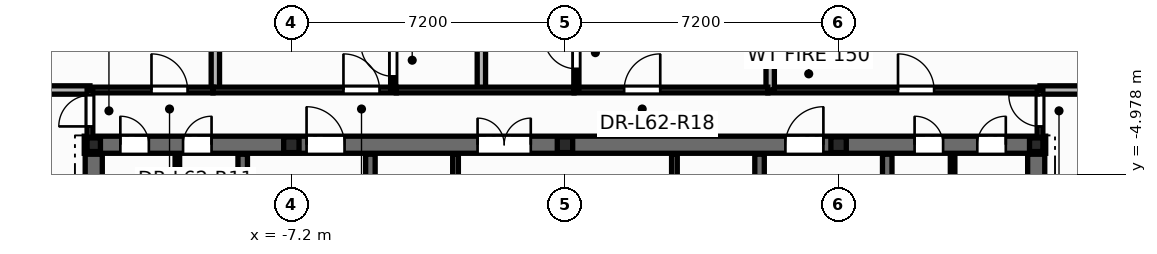
"""IFC4 building model, lengths in metres.
Left out: names, types, materials, properties, quantities, classifications, styles, units other than length and angle.
Written with IfcOpenShell. Run it as: python <this file> out.ifc"""

import sys

from ifc_helpers import new_model, si_unit, direction, frame, frame_2d, origin, origin_2d, place, context, subcontext, project, spatial, rectangle, i_section, extrude, element, fill, save


model = new_model("IFC4")
c1 = context("Model", 3, precision=1e-05, world=origin(), true_north=direction((0.0, 1.0)))
c2 = subcontext(c1, "Body", "Model", "MODEL_VIEW")
j1 = project(units=[si_unit("LENGTHUNIT", "METRE"), si_unit("PLANEANGLEUNIT", "RADIAN")], contexts=[c1])
p1 = place(None, origin())
s1 = spatial("IfcSite", under=j1, at=p1, CompositionType="ELEMENT")
p2 = place(p1, origin())
s2 = spatial("IfcBuilding", under=s1, at=p2, CompositionType="ELEMENT")
p3 = place(p2, frame((0.0, 0.0, 237.0)))
s3 = spatial("IfcBuildingStorey", under=s2, at=p3, CompositionType="ELEMENT", Elevation=237.0)
for number, where, z_axis, x_axis in (
    (1, (12.4, -4.2, 0.0), (0.0, 0.0, 1.0), (1.0, 0.0, 0.0)),
    (2, (-12.4, -4.2, 0.0), (0.0, 0.0, 1.0), (1.0, 0.0, 0.0)),
):
    element("IfcColumn", number, at=place(p3, frame(where, z_axis=z_axis, x_axis=x_axis)), inside=s3, PredefinedType="COLUMN", context=c2, shape_type="SweptSolid", body=[
        extrude(i_section(OverallWidth=0.352, OverallDepth=0.359, WebThickness=0.018, FlangeThickness=0.026, at=origin_2d()), origin(), (0.0, 0.0, 1.0), 3.6),
    ])
for number, where, z_axis, x_axis in (
    (3, (-7.2, -4.2, 0.0), (0.0, 0.0, 1.0), (1.0, 0.0, 0.0)),
    (4, (0.0, -4.2, 0.0), (0.0, 0.0, 1.0), (1.0, 0.0, 0.0)),
    (5, (7.2, -4.2, 0.0), (0.0, 0.0, 1.0), (1.0, 0.0, 0.0)),
):
    element("IfcColumn", number, at=place(p3, frame(where, z_axis=z_axis, x_axis=x_axis)), inside=s3, PredefinedType="PILASTER", context=c2, shape_type="SweptSolid", body=[
        extrude(i_section(OverallWidth=0.405, OverallDepth=0.414, WebThickness=0.022, FlangeThickness=0.032, at=origin_2d()), origin(), (0.0, 0.0, 1.0), 3.6),
    ])
p4 = place(p3, frame((-2.88, -7.1, 0.0), z_axis=(0.0, 0.0, 1.0), x_axis=(0.0, 1.0, 0.0)))
e6 = element("IfcWall", 6, at=p4, inside=s3, PredefinedType="PARTITIONING", context=c2, shape_type="SweptSolid", body=[
    extrude(rectangle(XDim=2.65, YDim=0.15, at=frame_2d((1.325, 0.0))), origin(), (0.0, 0.0, 1.0), 3.345),
])
p5 = place(p4, frame((0.85, 0.0, 0.0)))
e7 = element("IfcOpeningElement", 7, at=p5, cuts=e6, PredefinedType="OPENING", context=c2, shape_type="SweptSolid", body=[
    extrude(rectangle(XDim=0.886, YDim=2.104, at=frame_2d((0.44, 1.052))), frame((0.0, 0.085, 0.0), z_axis=(0.0, -1.0, 0.0), x_axis=(1.0, 0.0, 0.0)), (0.0, 0.0, 1.0), 0.17),
])
p6 = place(p3, frame((2.88, -7.1, 0.0), z_axis=(0.0, 0.0, 1.0), x_axis=(0.0, 1.0, 0.0)))
e8 = element("IfcWall", 8, at=p6, inside=s3, PredefinedType="PARTITIONING", context=c2, shape_type="SweptSolid", body=[
    extrude(rectangle(XDim=2.65, YDim=0.15, at=frame_2d((1.325, 0.0))), origin(), (0.0, 0.0, 1.0), 3.345),
])
p7 = place(p6, frame((0.85, 0.0, 0.0)))
e9 = element("IfcOpeningElement", 9, at=p7, cuts=e8, PredefinedType="OPENING", context=c2, shape_type="SweptSolid", body=[
    extrude(rectangle(XDim=0.886, YDim=2.104, at=frame_2d((0.44, 1.052))), frame((0.0, 0.085, 0.0), z_axis=(0.0, -1.0, 0.0), x_axis=(1.0, 0.0, 0.0)), (0.0, 0.0, 1.0), 0.17),
])
for number, where, z_axis, x_axis in (
    (10, (-10.2, -5.52, 0.0), (0.0, 0.0, 1.0), (0.0, 1.0, 0.0)),
    (11, (10.2, -5.52, 0.0), (0.0, 0.0, 1.0), (0.0, 1.0, 0.0)),
):
    element("IfcWall", number, at=place(p3, frame(where, z_axis=z_axis, x_axis=x_axis)), inside=s3, PredefinedType="PARTITIONING", context=c2, shape_type="SweptSolid", body=[
        extrude(rectangle(XDim=1.12, YDim=0.12, at=frame_2d((0.56, 0.0))), origin(), (0.0, 0.0, 1.0), 3.345),
    ])
p8 = place(p3, frame((-12.65, -4.2, 0.0), z_axis=(0.0, 0.0, 1.0), x_axis=(1.0, 0.0, 0.0)))
e12 = element("IfcWall", 12, at=p8, inside=s3, PredefinedType="SHEAR", context=c2, shape_type="SweptSolid", body=[
    extrude(rectangle(XDim=25.3, YDim=0.45, at=frame_2d((12.65, 0.0))), origin(), (0.0, 0.0, 1.0), 3.6),
])
p9 = place(p8, frame((0.95, 0.0, 0.0)))
e13 = element("IfcOpeningElement", 13, at=p9, cuts=e12, PredefinedType="OPENING", context=c2, shape_type="SweptSolid", body=[
    extrude(rectangle(XDim=0.756, YDim=2.054, at=frame_2d((0.375, 1.027))), frame((0.0, 0.235, 0.0), z_axis=(0.0, -1.0, 0.0), x_axis=(1.0, 0.0, 0.0)), (0.0, 0.0, 1.0), 0.47),
])
p10 = place(p8, frame((2.6, 0.0, 0.0)))
e14 = element("IfcOpeningElement", 14, at=p10, cuts=e12, PredefinedType="OPENING", context=c2, shape_type="SweptSolid", body=[
    extrude(rectangle(XDim=0.756, YDim=2.054, at=frame_2d((0.375, 1.027))), frame((0.0, 0.235, 0.0), z_axis=(0.0, -1.0, 0.0), x_axis=(1.0, 0.0, 0.0)), (0.0, 0.0, 1.0), 0.47),
])
p11 = place(p8, frame((21.85, 0.0, 0.0)))
e15 = element("IfcOpeningElement", 15, at=p11, cuts=e12, PredefinedType="OPENING", context=c2, shape_type="SweptSolid", body=[
    extrude(rectangle(XDim=0.756, YDim=2.054, at=frame_2d((0.375, 1.027))), frame((0.0, 0.235, 0.0), z_axis=(0.0, -1.0, 0.0), x_axis=(1.0, 0.0, 0.0)), (0.0, 0.0, 1.0), 0.47),
])
p12 = place(p8, frame((23.5, 0.0, 0.0)))
e16 = element("IfcOpeningElement", 16, at=p12, cuts=e12, PredefinedType="OPENING", context=c2, shape_type="SweptSolid", body=[
    extrude(rectangle(XDim=0.756, YDim=2.054, at=frame_2d((0.375, 1.027))), frame((0.0, 0.235, 0.0), z_axis=(0.0, -1.0, 0.0), x_axis=(1.0, 0.0, 0.0)), (0.0, 0.0, 1.0), 0.47),
])
p13 = place(p8, frame((5.85, 0.0, 0.0)))
e17 = element("IfcOpeningElement", 17, at=p13, cuts=e12, PredefinedType="OPENING", context=c2, shape_type="SweptSolid", body=[
    extrude(rectangle(XDim=1.006, YDim=2.104, at=frame_2d((0.5, 1.052))), frame((0.0, 0.235, 0.0), z_axis=(0.0, -1.0, 0.0), x_axis=(1.0, 0.0, 0.0)), (0.0, 0.0, 1.0), 0.47),
])
p14 = place(p8, frame((10.35, 0.0, 0.0)))
e18 = element("IfcOpeningElement", 18, at=p14, cuts=e12, PredefinedType="OPENING", context=c2, shape_type="SweptSolid", body=[
    extrude(rectangle(XDim=1.406, YDim=2.154, at=frame_2d((0.7, 1.077))), frame((0.0, 0.235, 0.0), z_axis=(0.0, -1.0, 0.0), x_axis=(1.0, 0.0, 0.0)), (0.0, 0.0, 1.0), 0.47),
])
p15 = place(p8, frame((18.45, 0.0, 0.0)))
e19 = element("IfcOpeningElement", 19, at=p15, cuts=e12, PredefinedType="OPENING", context=c2, shape_type="SweptSolid", body=[
    extrude(rectangle(XDim=1.006, YDim=2.104, at=frame_2d((0.5, 1.052))), frame((0.0, 0.235, 0.0), z_axis=(0.0, -1.0, 0.0), x_axis=(1.0, 0.0, 0.0)), (0.0, 0.0, 1.0), 0.47),
])
p16 = place(p3, frame((-8.48, -13.85, 0.0), z_axis=(0.0, 0.0, 1.0), x_axis=(0.0, 1.0, 0.0)))
e20 = element("IfcWall", 20, at=p16, inside=s3, PredefinedType="SHEAR", context=c2, shape_type="SweptSolid", body=[
    extrude(rectangle(XDim=9.4, YDim=0.25, at=frame_2d((4.7, 0.0))), origin(), (0.0, 0.0, 1.0), 3.6),
])
p17 = place(p16, frame((6.95, 0.0, 0.0)))
e21 = element("IfcOpeningElement", 21, at=p17, cuts=e20, PredefinedType="OPENING", context=c2, shape_type="SweptSolid", body=[
    extrude(rectangle(XDim=1.006, YDim=2.104, at=frame_2d((0.5, 1.052))), frame((0.0, 0.135, 0.0), z_axis=(0.0, -1.0, 0.0), x_axis=(1.0, 0.0, 0.0)), (0.0, 0.0, 1.0), 0.27),
])
p18 = place(p3, frame((8.48, -13.85, 0.0), z_axis=(0.0, 0.0, 1.0), x_axis=(0.0, 1.0, 0.0)))
e22 = element("IfcWall", 22, at=p18, inside=s3, PredefinedType="SHEAR", context=c2, shape_type="SweptSolid", body=[
    extrude(rectangle(XDim=9.4, YDim=0.25, at=frame_2d((4.7, 0.0))), origin(), (0.0, 0.0, 1.0), 3.6),
])
p19 = place(p18, frame((6.95, 0.0, 0.0)))
e23 = element("IfcOpeningElement", 23, at=p19, cuts=e22, PredefinedType="OPENING", context=c2, shape_type="SweptSolid", body=[
    extrude(rectangle(XDim=1.006, YDim=2.104, at=frame_2d((0.5, 1.052))), frame((0.0, 0.135, 0.0), z_axis=(0.0, -1.0, 0.0), x_axis=(1.0, 0.0, 0.0)), (0.0, 0.0, 1.0), 0.27),
])
for number, where, z_axis, x_axis in (
    (24, (-5.12, -13.85, 0.0), (0.0, 0.0, 1.0), (0.0, 1.0, 0.0)),
    (25, (5.12, -13.85, 0.0), (0.0, 0.0, 1.0), (0.0, 1.0, 0.0)),
):
    element("IfcWall", number, at=place(p3, frame(where, z_axis=z_axis, x_axis=x_axis)), inside=s3, PredefinedType="SHEAR", context=c2, shape_type="SweptSolid", body=[
        extrude(rectangle(XDim=9.4, YDim=0.25, at=frame_2d((4.7, 0.0))), origin(), (0.0, 0.0, 1.0), 3.6),
    ])
for number, where, z_axis, x_axis in (
    (26, (-12.4, -13.85, 0.0), (0.0, 0.0, 1.0), (0.0, 1.0, 0.0)),
    (27, (12.4, -13.85, 0.0), (0.0, 0.0, 1.0), (0.0, 1.0, 0.0)),
):
    element("IfcWall", number, at=place(p3, frame(where, z_axis=z_axis, x_axis=x_axis)), inside=s3, PredefinedType="SHEAR", context=c2, shape_type="SweptSolid", body=[
        extrude(rectangle(XDim=9.4, YDim=0.45, at=frame_2d((4.7, 0.0))), origin(), (0.0, 0.0, 1.0), 3.6),
    ])
p20 = place(p3, frame((-9.2, -2.76, 0.0), z_axis=(0.0, 0.0, 1.0), x_axis=(0.0, 1.0, 0.0)))
e28 = element("IfcWall", 28, at=p20, inside=s3, PredefinedType="PARTITIONING", context=c2, shape_type="SweptSolid", body=[
    extrude(rectangle(XDim=7.516, YDim=0.22, at=frame_2d((3.758, 0.0))), origin(), (0.0, 0.0, 1.0), 2.62),
])
p21 = place(p3, frame((5.34, -2.76, 0.0), z_axis=(0.0, 0.0, 1.0), x_axis=(1.0, 0.0, 0.0)))
e29 = element("IfcWall", 29, at=p21, inside=s3, PredefinedType="PARTITIONING", context=c2, shape_type="SweptSolid", body=[
    extrude(rectangle(XDim=7.16, YDim=0.15, at=frame_2d((3.58, 0.0))), origin(), (0.0, 0.0, 1.0), 2.32),
])
p22 = place(p21, frame((3.423, 0.0, 0.0)))
e30 = element("IfcOpeningElement", 30, at=p22, cuts=e29, PredefinedType="OPENING", context=c2, shape_type="SweptSolid", body=[
    extrude(rectangle(XDim=0.956, YDim=2.104, at=frame_2d((0.475, 1.052))), frame((0.0, 0.085, 0.0), z_axis=(0.0, -1.0, 0.0), x_axis=(1.0, 0.0, 0.0)), (0.0, 0.0, 1.0), 0.17),
])
p23 = place(p3, frame((5.4, -2.76, 0.0), z_axis=(0.0, 0.0, 1.0), x_axis=(0.0, 1.0, 0.0)))
e31 = element("IfcWall", 31, at=p23, inside=s3, PredefinedType="PARTITIONING", context=c2, shape_type="SweptSolid", body=[
    extrude(rectangle(XDim=12.816, YDim=0.22, at=frame_2d((6.408, 0.0))), origin(), (0.0, 0.0, 1.0), 2.32),
])
p24 = place(p3, frame((0.24, -2.76, 0.0), z_axis=(0.0, 0.0, 1.0), x_axis=(1.0, 0.0, 0.0)))
e32 = element("IfcWall", 32, at=p24, inside=s3, PredefinedType="PARTITIONING", context=c2, shape_type="SweptSolid", body=[
    extrude(rectangle(XDim=5.098, YDim=0.15, at=frame_2d((2.549, 0.0))), origin(), (0.0, 0.0, 1.0), 2.964),
])
p25 = place(p24, frame((1.317, 0.0, 0.0)))
e33 = element("IfcOpeningElement", 33, at=p25, cuts=e32, PredefinedType="OPENING", context=c2, shape_type="SweptSolid", body=[
    extrude(rectangle(XDim=0.956, YDim=2.104, at=frame_2d((0.475, 1.052))), frame((0.0, 0.085, 0.0), z_axis=(0.0, -1.0, 0.0), x_axis=(1.0, 0.0, 0.0)), (0.0, 0.0, 1.0), 0.17),
])
p26 = place(p3, frame((-9.26, -2.76, 0.0), z_axis=(0.0, 0.0, 1.0), x_axis=(1.0, 0.0, 0.0)))
e34 = element("IfcWall", 34, at=p26, inside=s3, PredefinedType="PARTITIONING", context=c2, shape_type="SweptSolid", body=[
    extrude(rectangle(XDim=4.82, YDim=0.15, at=frame_2d((2.41, 0.0))), origin(), (0.0, 0.0, 1.0), 2.32),
])
p27 = place(p26, frame((3.431, 0.0, 0.0)))
e35 = element("IfcOpeningElement", 35, at=p27, cuts=e34, PredefinedType="OPENING", context=c2, shape_type="SweptSolid", body=[
    extrude(rectangle(XDim=0.956, YDim=2.104, at=frame_2d((0.475, 1.052))), frame((0.0, 0.085, 0.0), z_axis=(0.0, -1.0, 0.0), x_axis=(1.0, 0.0, 0.0)), (0.0, 0.0, 1.0), 0.17),
])
p28 = place(p3, frame((-2.2, -2.76, 0.0), z_axis=(0.0, 0.0, 1.0), x_axis=(0.0, 1.0, 0.0)))
e36 = element("IfcWall", 36, at=p28, inside=s3, PredefinedType="PARTITIONING", context=c2, shape_type="SweptSolid", body=[
    extrude(rectangle(XDim=9.72, YDim=0.22, at=frame_2d((4.86, 0.0))), origin(), (0.0, 0.0, 1.0), 2.32),
])
p29 = place(p3, frame((-12.5, -2.76, 0.0), z_axis=(0.0, 0.0, 1.0), x_axis=(1.0, 0.0, 0.0)))
e37 = element("IfcWall", 37, at=p29, inside=s3, PredefinedType="PARTITIONING", context=c2, shape_type="SweptSolid", body=[
    extrude(rectangle(XDim=3.238, YDim=0.15, at=frame_2d((1.619, 0.0))), origin(), (0.0, 0.0, 1.0), 3.345),
])
p30 = place(p29, frame((1.619, 0.0, 0.0)))
e38 = element("IfcOpeningElement", 38, at=p30, cuts=e37, PredefinedType="OPENING", context=c2, shape_type="SweptSolid", body=[
    extrude(rectangle(XDim=0.956, YDim=2.104, at=frame_2d((0.475, 1.052))), frame((0.0, 0.085, 0.0), z_axis=(0.0, -1.0, 0.0), x_axis=(1.0, 0.0, 0.0)), (0.0, 0.0, 1.0), 0.17),
])
p31 = place(p3, frame((-4.52, -2.76, 0.0), z_axis=(0.0, 0.0, 1.0), x_axis=(0.0, 1.0, 0.0)))
e39 = element("IfcWall", 39, at=p31, inside=s3, PredefinedType="PARTITIONING", context=c2, shape_type="SweptSolid", body=[
    extrude(rectangle(XDim=2.92, YDim=0.135, at=frame_2d((1.46, 0.0))), origin(), (0.0, 0.0, 1.0), 3.345),
])
p32 = place(p31, frame((0.359, 0.0, 0.0)))
e40 = element("IfcOpeningElement", 40, at=p32, cuts=e39, PredefinedType="OPENING", context=c2, shape_type="SweptSolid", body=[
    extrude(rectangle(XDim=0.856, YDim=2.104, at=frame_2d((0.425, 1.052))), frame((0.0, 0.078, 0.0), z_axis=(0.0, -1.0, 0.0), x_axis=(1.0, 0.0, 0.0)), (0.0, 0.0, 1.0), 0.155),
])
p33 = place(p3, frame((0.3, -2.76, 0.0), z_axis=(0.0, 0.0, 1.0), x_axis=(0.0, 1.0, 0.0)))
e41 = element("IfcWall", 41, at=p33, inside=s3, PredefinedType="PARTITIONING", context=c2, shape_type="SweptSolid", body=[
    extrude(rectangle(XDim=2.92, YDim=0.135, at=frame_2d((1.46, 0.0))), origin(), (0.0, 0.0, 1.0), 2.32),
])
p34 = place(p33, frame((0.558, 0.0, 0.0)))
e42 = element("IfcOpeningElement", 42, at=p34, cuts=e41, PredefinedType="OPENING", context=c2, shape_type="SweptSolid", body=[
    extrude(rectangle(XDim=0.856, YDim=2.104, at=frame_2d((0.425, 1.052))), frame((0.0, 0.078, 0.0), z_axis=(0.0, -1.0, 0.0), x_axis=(1.0, 0.0, 0.0)), (0.0, 0.0, 1.0), 0.155),
])
p35 = place(p3, frame((-4.438, -2.76, 0.0), z_axis=(0.0, 0.0, 1.0), x_axis=(1.0, 0.0, 0.0)))
e43 = element("IfcWall", 43, at=p35, inside=s3, PredefinedType="PARTITIONING", context=c2, shape_type="SweptSolid", body=[
    extrude(rectangle(XDim=4.676, YDim=0.15, at=frame_2d((2.338, 0.0))), origin(), (0.0, 0.0, 1.0), 2.32),
])
for number, where, z_axis, x_axis in (
    (44, (-14.588, -2.76, 0.0), (0.0, 0.0, 1.0), (1.0, 0.0, 0.0)),
    (45, (12.5, -2.76, 0.0), (0.0, 0.0, 1.0), (1.0, 0.0, 0.0)),
):
    element("IfcWall", number, at=place(p3, frame(where, z_axis=z_axis, x_axis=x_axis)), inside=s3, PredefinedType="PARTITIONING", context=c2, shape_type="SweptSolid", body=[
        extrude(rectangle(XDim=2.088, YDim=0.22, at=frame_2d((1.044, 0.0))), origin(), (0.0, 0.0, 1.0), 2.62),
    ])
p36 = place(p3, frame((-12.5, -4.24, 0.0), z_axis=(0.0, 0.0, 1.0), x_axis=(0.0, 1.0, 0.0)))
e46 = element("IfcWall", 46, at=p36, inside=s3, PredefinedType="PARTITIONING", context=c2, shape_type="SweptSolid", body=[
    extrude(rectangle(XDim=1.48, YDim=0.15, at=frame_2d((0.74, 0.0))), origin(), (0.0, 0.0, 1.0), 2.32),
])
p37 = place(p36, frame((0.522, 0.0, 0.0)))
e47 = element("IfcOpeningElement", 47, at=p37, cuts=e46, PredefinedType="OPENING", context=c2, shape_type="SweptSolid", body=[
    extrude(rectangle(XDim=0.826, YDim=2.104, at=frame_2d((0.41, 1.052))), frame((0.0, 0.085, 0.0), z_axis=(0.0, -1.0, 0.0), x_axis=(1.0, 0.0, 0.0)), (0.0, 0.0, 1.0), 0.17),
])
p38 = place(p3, frame((12.5, -4.24, 0.0), z_axis=(0.0, 0.0, 1.0), x_axis=(0.0, 1.0, 0.0)))
e48 = element("IfcWall", 48, at=p38, inside=s3, PredefinedType="PARTITIONING", context=c2, shape_type="SweptSolid", body=[
    extrude(rectangle(XDim=1.48, YDim=0.15, at=frame_2d((0.74, 0.0))), origin(), (0.0, 0.0, 1.0), 2.32),
])
p39 = place(p38, frame((0.522, 0.0, 0.0)))
e49 = element("IfcOpeningElement", 49, at=p39, cuts=e48, PredefinedType="OPENING", context=c2, shape_type="SweptSolid", body=[
    extrude(rectangle(XDim=0.826, YDim=2.104, at=frame_2d((0.41, 1.052))), frame((0.0, 0.085, 0.0), z_axis=(0.0, -1.0, 0.0), x_axis=(1.0, 0.0, 0.0)), (0.0, 0.0, 1.0), 0.17),
])
p40 = place(p9, origin())
e50 = element("IfcDoor", 50, at=p40, inside=s3, OperationType="SINGLE_SWING_LEFT", PredefinedType="DOOR", context=c2, shape_type="SweptSolid", body=[
    extrude(rectangle(XDim=0.75, YDim=2.05, at=frame_2d((0.375, 1.025))), frame((0.0, 0.025, 0.0), z_axis=(0.0, -1.0, 0.0), x_axis=(1.0, 0.0, 0.0)), (0.0, 0.0, 1.0), 0.05),
])
fill(e13, e50)
p41 = place(p10, origin())
e51 = element("IfcDoor", 51, at=p41, inside=s3, OperationType="SINGLE_SWING_RIGHT", PredefinedType="DOOR", context=c2, shape_type="SweptSolid", body=[
    extrude(rectangle(XDim=0.75, YDim=2.05, at=frame_2d((0.375, 1.025))), frame((0.0, 0.025, 0.0), z_axis=(0.0, -1.0, 0.0), x_axis=(1.0, 0.0, 0.0)), (0.0, 0.0, 1.0), 0.05),
])
fill(e14, e51)
p42 = place(p11, origin())
e52 = element("IfcDoor", 52, at=p42, inside=s3, OperationType="SINGLE_SWING_LEFT", PredefinedType="DOOR", context=c2, shape_type="SweptSolid", body=[
    extrude(rectangle(XDim=0.75, YDim=2.05, at=frame_2d((0.375, 1.025))), frame((0.0, 0.025, 0.0), z_axis=(0.0, -1.0, 0.0), x_axis=(1.0, 0.0, 0.0)), (0.0, 0.0, 1.0), 0.05),
])
fill(e15, e52)
p43 = place(p12, origin())
e53 = element("IfcDoor", 53, at=p43, inside=s3, OperationType="SINGLE_SWING_RIGHT", PredefinedType="DOOR", context=c2, shape_type="SweptSolid", body=[
    extrude(rectangle(XDim=0.75, YDim=2.05, at=frame_2d((0.375, 1.025))), frame((0.0, 0.025, 0.0), z_axis=(0.0, -1.0, 0.0), x_axis=(1.0, 0.0, 0.0)), (0.0, 0.0, 1.0), 0.05),
])
fill(e16, e53)
p44 = place(p13, origin())
e54 = element("IfcDoor", 54, at=p44, inside=s3, OperationType="SINGLE_SWING_LEFT", PredefinedType="DOOR", context=c2, shape_type="SweptSolid", body=[
    extrude(rectangle(XDim=1.0, YDim=2.1, at=frame_2d((0.5, 1.05))), frame((0.0, 0.025, 0.0), z_axis=(0.0, -1.0, 0.0), x_axis=(1.0, 0.0, 0.0)), (0.0, 0.0, 1.0), 0.05),
])
fill(e17, e54)
p45 = place(p14, origin())
e55 = element("IfcDoor", 55, at=p45, inside=s3, OperationType="DOUBLE_DOOR_SINGLE_SWING", PredefinedType="DOOR", context=c2, shape_type="SweptSolid", body=[
    extrude(rectangle(XDim=1.4, YDim=2.15, at=frame_2d((0.7, 1.075))), frame((0.0, 0.025, 0.0), z_axis=(0.0, -1.0, 0.0), x_axis=(1.0, 0.0, 0.0)), (0.0, 0.0, 1.0), 0.05),
])
fill(e18, e55)
p46 = place(p15, origin())
e56 = element("IfcDoor", 56, at=p46, inside=s3, OperationType="SINGLE_SWING_RIGHT", PredefinedType="DOOR", context=c2, shape_type="SweptSolid", body=[
    extrude(rectangle(XDim=1.0, YDim=2.1, at=frame_2d((0.5, 1.05))), frame((0.0, 0.025, 0.0), z_axis=(0.0, -1.0, 0.0), x_axis=(1.0, 0.0, 0.0)), (0.0, 0.0, 1.0), 0.05),
])
fill(e19, e56)
p47 = place(p37, origin())
e57 = element("IfcDoor", 57, at=p47, inside=s3, OperationType="SINGLE_SWING_LEFT", PredefinedType="DOOR", context=c2, shape_type="SweptSolid", body=[
    extrude(rectangle(XDim=0.82, YDim=2.1, at=frame_2d((0.41, 1.05))), frame((0.0, 0.025, 0.0), z_axis=(0.0, -1.0, 0.0), x_axis=(1.0, 0.0, 0.0)), (0.0, 0.0, 1.0), 0.05),
])
fill(e47, e57)
p48 = place(p39, origin())
e58 = element("IfcDoor", 58, at=p48, inside=s3, OperationType="SINGLE_SWING_RIGHT", PredefinedType="DOOR", context=c2, shape_type="SweptSolid", body=[
    extrude(rectangle(XDim=0.82, YDim=2.1, at=frame_2d((0.41, 1.05))), frame((0.0, 0.025, 0.0), z_axis=(0.0, -1.0, 0.0), x_axis=(1.0, 0.0, 0.0)), (0.0, 0.0, 1.0), 0.05),
])
fill(e49, e58)
p49 = place(p30, origin())
e59 = element("IfcDoor", 59, at=p49, inside=s3, OperationType="SINGLE_SWING_LEFT", PredefinedType="DOOR", context=c2, shape_type="SweptSolid", body=[
    extrude(rectangle(XDim=0.95, YDim=2.1, at=frame_2d((0.475, 1.05))), frame((0.0, 0.025, 0.0), z_axis=(0.0, -1.0, 0.0), x_axis=(1.0, 0.0, 0.0)), (0.0, 0.0, 1.0), 0.05),
])
fill(e38, e59)
p50 = place(p32, origin())
e60 = element("IfcDoor", 60, at=p50, inside=s3, OperationType="SINGLE_SWING_RIGHT", PredefinedType="DOOR", context=c2, shape_type="SweptSolid", body=[
    extrude(rectangle(XDim=0.85, YDim=2.1, at=frame_2d((0.425, 1.05))), frame((0.0, 0.025, 0.0), z_axis=(0.0, -1.0, 0.0), x_axis=(1.0, 0.0, 0.0)), (0.0, 0.0, 1.0), 0.05),
])
fill(e40, e60)
p51 = place(p27, origin())
e61 = element("IfcDoor", 61, at=p51, inside=s3, OperationType="SINGLE_SWING_LEFT", PredefinedType="DOOR", context=c2, shape_type="SweptSolid", body=[
    extrude(rectangle(XDim=0.95, YDim=2.1, at=frame_2d((0.475, 1.05))), frame((0.0, 0.025, 0.0), z_axis=(0.0, -1.0, 0.0), x_axis=(1.0, 0.0, 0.0)), (0.0, 0.0, 1.0), 0.05),
])
fill(e35, e61)
p52 = place(p34, origin())
e62 = element("IfcDoor", 62, at=p52, inside=s3, OperationType="SINGLE_SWING_RIGHT", PredefinedType="DOOR", context=c2, shape_type="SweptSolid", body=[
    extrude(rectangle(XDim=0.85, YDim=2.1, at=frame_2d((0.425, 1.05))), frame((0.0, 0.025, 0.0), z_axis=(0.0, -1.0, 0.0), x_axis=(1.0, 0.0, 0.0)), (0.0, 0.0, 1.0), 0.05),
])
fill(e42, e62)
p53 = place(p25, origin())
e63 = element("IfcDoor", 63, at=p53, inside=s3, OperationType="SINGLE_SWING_RIGHT", PredefinedType="DOOR", context=c2, shape_type="SweptSolid", body=[
    extrude(rectangle(XDim=0.95, YDim=2.1, at=frame_2d((0.475, 1.05))), frame((0.0, 0.025, 0.0), z_axis=(0.0, -1.0, 0.0), x_axis=(1.0, 0.0, 0.0)), (0.0, 0.0, 1.0), 0.05),
])
fill(e33, e63)
p54 = place(p22, origin())
e64 = element("IfcDoor", 64, at=p54, inside=s3, OperationType="SINGLE_SWING_LEFT", PredefinedType="DOOR", context=c2, shape_type="SweptSolid", body=[
    extrude(rectangle(XDim=0.95, YDim=2.1, at=frame_2d((0.475, 1.05))), frame((0.0, 0.025, 0.0), z_axis=(0.0, -1.0, 0.0), x_axis=(1.0, 0.0, 0.0)), (0.0, 0.0, 1.0), 0.05),
])
fill(e30, e64)
save(model, sys.argv[1])
